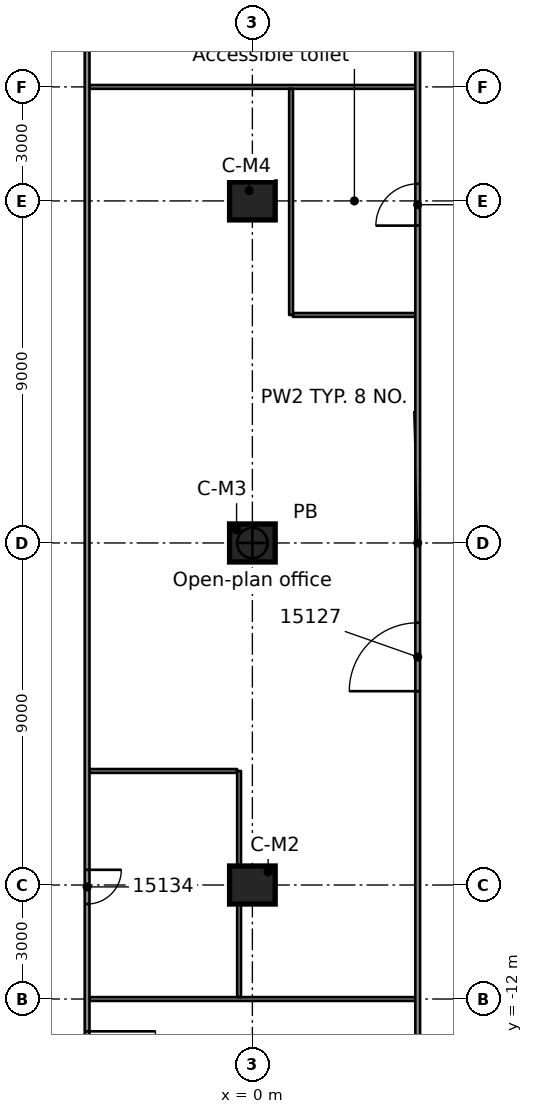
"""IFC4 building model, lengths in metres.
Left out: names, types, materials, properties, quantities, classifications, styles, units other than length and angle.
Written with IfcOpenShell. Run it as: python <this file> out.ifc"""

import sys

from ifc_helpers import new_model, si_unit, direction, frame, frame_2d, origin, origin_2d, place, context, subcontext, project, spatial, rectangle, extrude, element, fill, save


model = new_model("IFC4")
c1 = context("Model", 3, precision=1e-05, world=origin(), true_north=direction((0.0, 1.0)))
c2 = subcontext(c1, "Body", "Model", "MODEL_VIEW")
j1 = project(units=[si_unit("LENGTHUNIT", "METRE"), si_unit("PLANEANGLEUNIT", "RADIAN")], contexts=[c1])
p1 = place(None, origin())
s1 = spatial("IfcSite", under=j1, at=p1, CompositionType="ELEMENT")
p2 = place(p1, origin())
s2 = spatial("IfcBuilding", under=s1, at=p2, CompositionType="ELEMENT")
p3 = place(p2, frame((0.0, 0.0, 76.3)))
s3 = spatial("IfcBuildingStorey", under=s2, at=p3, CompositionType="ELEMENT", Elevation=76.3)
for number, where, z_axis, x_axis in (
    (1, (0.0, -9.0, 0.0), (0.0, 0.0, 1.0), (1.0, 0.0, 0.0)),
    (2, (0.0, 0.0, 0.0), (0.0, 0.0, 1.0), (1.0, 0.0, 0.0)),
    (3, (0.0, 9.0, 0.0), (0.0, 0.0, 1.0), (1.0, 0.0, 0.0)),
):
    element("IfcColumn", number, at=place(p3, frame(where, z_axis=z_axis, x_axis=x_axis)), inside=s3, PredefinedType="COLUMN", context=c2, shape_type="SweptSolid", body=[
        extrude(rectangle(XDim=1.2, YDim=1.0, at=origin_2d()), origin(), (0.0, 0.0, 1.0), 4.4),
    ])
p4 = place(p3, frame((-4.287, -12.0, 0.0), z_axis=(0.0, 0.0, 1.0), x_axis=(1.0, 0.0, 0.0)))
e4 = element("IfcWall", 4, at=p4, inside=s3, PredefinedType="PARTITIONING", context=c2, shape_type="SweptSolid", body=[
    extrude(rectangle(XDim=8.574, YDim=0.1, at=frame_2d((4.287, 0.0))), origin(), (0.0, 0.0, 1.0), 3.98),
])
p5 = place(p3, frame((-4.287, -5.999, 0.0), z_axis=(0.0, 0.0, 1.0), x_axis=(1.0, 0.0, 0.0)))
e5 = element("IfcWall", 5, at=p5, inside=s3, PredefinedType="PARTITIONING", context=c2, shape_type="SweptSolid", body=[
    extrude(rectangle(XDim=3.886, YDim=0.1, at=frame_2d((1.943, 0.0))), origin(), (0.0, 0.0, 1.0), 3.98),
])
p6 = place(p3, frame((1.068, 6.0, 0.0), z_axis=(0.0, 0.0, 1.0), x_axis=(1.0, 0.0, 0.0)))
e6 = element("IfcWall", 6, at=p6, inside=s3, PredefinedType="PARTITIONING", context=c2, shape_type="SweptSolid", body=[
    extrude(rectangle(XDim=3.219, YDim=0.1, at=frame_2d((1.609, 0.0))), origin(), (0.0, 0.0, 1.0), 3.98),
])
p7 = place(p3, frame((-4.287, 12.0, 0.0), z_axis=(0.0, 0.0, 1.0), x_axis=(1.0, 0.0, 0.0)))
e7 = element("IfcWall", 7, at=p7, inside=s3, PredefinedType="PARTITIONING", context=c2, shape_type="SweptSolid", body=[
    extrude(rectangle(XDim=8.574, YDim=0.1, at=frame_2d((4.287, 0.0))), origin(), (0.0, 0.0, 1.0), 3.98),
])
p8 = place(p3, frame((4.35, -15.6, 0.0), z_axis=(0.0, 0.0, 1.0), x_axis=(0.0, 1.0, 0.0)))
e8 = element("IfcWall", 8, at=p8, inside=s3, PredefinedType="PARTITIONING", context=c2, shape_type="SweptSolid", body=[
    extrude(rectangle(XDim=31.201, YDim=0.125, at=frame_2d((15.601, 0.0))), origin(), (0.0, 0.0, 1.0), 3.98),
])
p9 = place(p8, frame((11.7, 0.0, 0.0)))
e9 = element("IfcOpeningElement", 9, at=p9, cuts=e8, PredefinedType="OPENING", context=c2, shape_type="SweptSolid", body=[
    extrude(rectangle(XDim=1.8, YDim=2.1, at=frame_2d((0.9, 1.05))), frame((0.0, 0.073, 0.0), z_axis=(0.0, -1.0, 0.0), x_axis=(1.0, 0.0, 0.0)), (0.0, 0.0, 1.0), 0.145),
])
p10 = place(p8, frame((23.95, 0.0, 0.0)))
e10 = element("IfcOpeningElement", 10, at=p10, cuts=e8, PredefinedType="OPENING", context=c2, shape_type="SweptSolid", body=[
    extrude(rectangle(XDim=1.1, YDim=2.1, at=frame_2d((0.55, 1.05))), frame((0.0, 0.073, 0.0), z_axis=(0.0, -1.0, 0.0), x_axis=(1.0, 0.0, 0.0)), (0.0, 0.0, 1.0), 0.145),
])
for number, where, z_axis, x_axis in (
    (11, (1.018, 6.0, 0.0), (0.0, 0.0, 1.0), (0.0, 1.0, 0.0)),
    (12, (-0.35, -11.95, 0.0), (0.0, 0.0, 1.0), (0.0, 1.0, 0.0)),
):
    element("IfcWall", number, at=place(p3, frame(where, z_axis=z_axis, x_axis=x_axis)), inside=s3, PredefinedType="PARTITIONING", context=c2, shape_type="SweptSolid", body=[
        extrude(rectangle(XDim=5.95, YDim=0.1, at=frame_2d((2.975, 0.0))), origin(), (0.0, 0.0, 1.0), 3.98),
    ])
p11 = place(p3, frame((-4.349, 15.6, 0.0), z_axis=(0.0, 0.0, 1.0), x_axis=(0.0, -1.0, 0.0)))
e13 = element("IfcWall", 13, at=p11, inside=s3, PredefinedType="PARTITIONING", context=c2, shape_type="SweptSolid", body=[
    extrude(rectangle(XDim=31.2, YDim=0.125, at=frame_2d((15.6, 0.0))), origin(), (0.0, 0.0, 1.0), 3.98),
])
p12 = place(p11, frame((28.45, 0.0, 0.0)))
e14 = element("IfcOpeningElement", 14, at=p12, cuts=e13, PredefinedType="OPENING", context=c2, shape_type="SweptSolid", body=[
    extrude(rectangle(XDim=1.8, YDim=2.1, at=frame_2d((0.9, 1.05))), frame((0.0, 0.073, 0.0), z_axis=(0.0, -1.0, 0.0), x_axis=(1.0, 0.0, 0.0)), (0.0, 0.0, 1.0), 0.145),
])
p13 = place(p11, frame((0.85, 0.0, 0.0)))
e15 = element("IfcOpeningElement", 15, at=p13, cuts=e13, PredefinedType="OPENING", context=c2, shape_type="SweptSolid", body=[
    extrude(rectangle(XDim=1.8, YDim=2.1, at=frame_2d((0.9, 1.05))), frame((0.0, 0.073, 0.0), z_axis=(0.0, -1.0, 0.0), x_axis=(1.0, 0.0, 0.0)), (0.0, 0.0, 1.0), 0.145),
])
p14 = place(p11, frame((24.2, 0.0, 0.0)))
e16 = element("IfcOpeningElement", 16, at=p14, cuts=e13, PredefinedType="OPENING", context=c2, shape_type="SweptSolid", body=[
    extrude(rectangle(XDim=0.9, YDim=2.1, at=frame_2d((0.45, 1.05))), frame((0.0, 0.073, 0.0), z_axis=(0.0, -1.0, 0.0), x_axis=(1.0, 0.0, 0.0)), (0.0, 0.0, 1.0), 0.145),
])
p15 = place(p12, origin())
e17 = element("IfcDoor", 17, at=p15, inside=s3, OperationType="DOUBLE_DOOR_SINGLE_SWING", PredefinedType="DOOR", context=c2, shape_type="SweptSolid", body=[
    extrude(rectangle(XDim=1.8, YDim=2.1, at=frame_2d((0.9, 1.05))), frame((0.0, 0.025, 0.0), z_axis=(0.0, -1.0, 0.0), x_axis=(1.0, 0.0, 0.0)), (0.0, 0.0, 1.0), 0.05),
])
fill(e14, e17)
p16 = place(p9, origin())
e18 = element("IfcDoor", 18, at=p16, inside=s3, OperationType="DOUBLE_DOOR_SINGLE_SWING", PredefinedType="DOOR", context=c2, shape_type="SweptSolid", body=[
    extrude(rectangle(XDim=1.8, YDim=2.1, at=frame_2d((0.9, 1.05))), frame((0.0, 0.025, 0.0), z_axis=(0.0, -1.0, 0.0), x_axis=(1.0, 0.0, 0.0)), (0.0, 0.0, 1.0), 0.05),
])
fill(e9, e18)
p17 = place(p14, origin())
e19 = element("IfcDoor", 19, at=p17, inside=s3, OperationType="SINGLE_SWING_RIGHT", PredefinedType="DOOR", context=c2, shape_type="SweptSolid", body=[
    extrude(rectangle(XDim=0.9, YDim=2.1, at=frame_2d((0.45, 1.05))), frame((0.0, 0.025, 0.0), z_axis=(0.0, -1.0, 0.0), x_axis=(1.0, 0.0, 0.0)), (0.0, 0.0, 1.0), 0.05),
])
fill(e16, e19)
p18 = place(p10, origin())
e20 = element("IfcDoor", 20, at=p18, inside=s3, OperationType="SINGLE_SWING_RIGHT", PredefinedType="DOOR", context=c2, shape_type="SweptSolid", body=[
    extrude(rectangle(XDim=1.1, YDim=2.1, at=frame_2d((0.55, 1.05))), frame((0.0, 0.025, 0.0), z_axis=(0.0, -1.0, 0.0), x_axis=(1.0, 0.0, 0.0)), (0.0, 0.0, 1.0), 0.05),
])
fill(e10, e20)
save(model, sys.argv[1])
